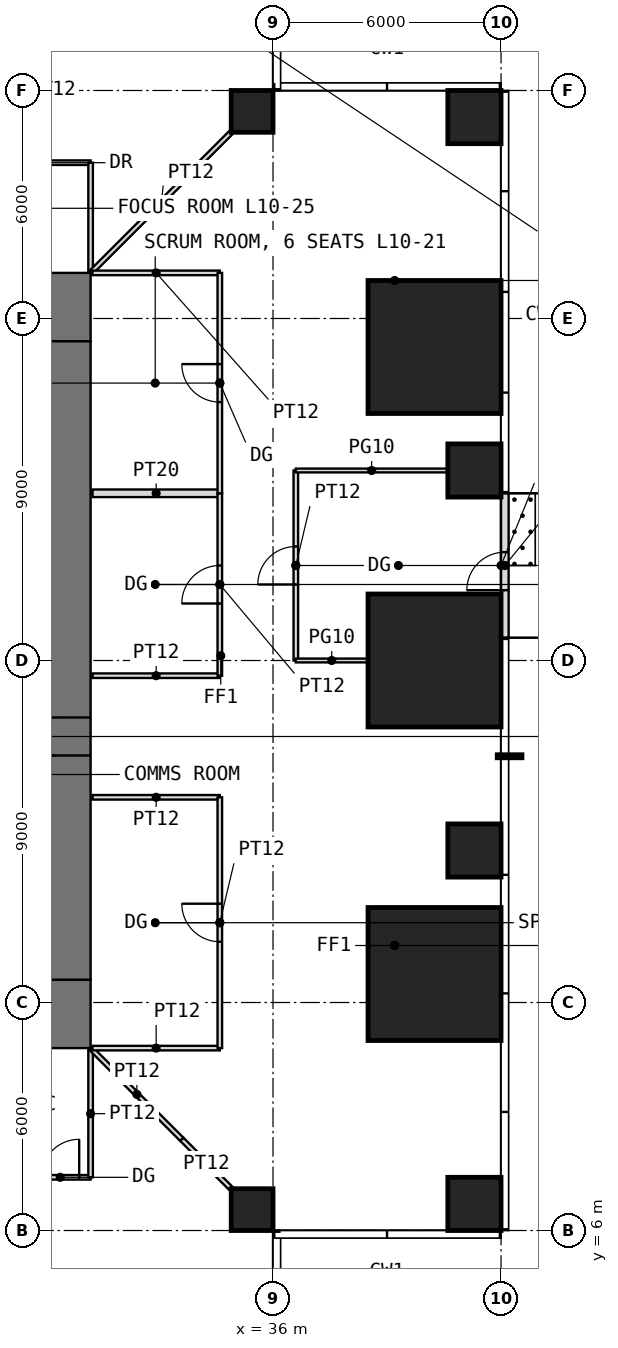
"""IFC4 building model, lengths in metres.
Left out: names, types, materials, properties, quantities, classifications, styles, units other than length and angle.
Written with IfcOpenShell. Run it as: python <this file> out.ifc"""

import sys

from ifc_helpers import new_model, si_unit, direction, frame, frame_2d, origin, origin_2d, place, context, subcontext, project, spatial, rectangle, extrude, element, fill, save


model = new_model("IFC4")
c1 = context("Model", 3, precision=1e-05, world=origin(), true_north=direction((0.0, 1.0)))
c2 = subcontext(c1, "Body", "Model", "MODEL_VIEW")
j1 = project(units=[si_unit("LENGTHUNIT", "METRE"), si_unit("PLANEANGLEUNIT", "RADIAN")], contexts=[c1])
p1 = place(None, origin())
s1 = spatial("IfcSite", under=j1, at=p1, CompositionType="ELEMENT")
p2 = place(p1, origin())
s2 = spatial("IfcBuilding", under=s1, at=p2, CompositionType="ELEMENT")
p3 = place(p2, frame((0.0, 0.0, 46.5)))
s3 = spatial("IfcBuildingStorey", under=s2, at=p3, CompositionType="ELEMENT", Elevation=46.5)
p4 = place(p3, frame((35.45, 6.55, 0.0), z_axis=(0.0, 0.0, 1.0), x_axis=(1.0, 0.0, 0.0)))
e1 = element("IfcColumn", 1, at=p4, inside=s3, PredefinedType="COLUMN", context=c2, shape_type="SweptSolid", body=[
    extrude(rectangle(XDim=1.1, YDim=1.1, at=origin_2d()), origin(), (0.0, 0.0, 1.0), 4.0),
])
p5 = place(p3, frame((41.3, 6.7, 0.0), z_axis=(0.0, 0.0, 1.0), x_axis=(1.0, 0.0, 0.0)))
e2 = element("IfcColumn", 2, at=p5, inside=s3, PredefinedType="COLUMN", context=c2, shape_type="SweptSolid", body=[
    extrude(rectangle(XDim=1.4, YDim=1.4, at=origin_2d()), origin(), (0.0, 0.0, 1.0), 4.0),
])
p6 = place(p3, frame((40.25, 12.75, 0.0), z_axis=(0.0, 0.0, 1.0), x_axis=(1.0, 0.0, 0.0)))
e3 = element("IfcColumn", 3, at=p6, inside=s3, PredefinedType="COLUMN", context=c2, shape_type="SweptSolid", body=[
    extrude(rectangle(XDim=3.5, YDim=3.5, at=origin_2d()), origin(), (0.0, 0.0, 1.0), 4.0),
])
p7 = place(p3, frame((41.3, 16.0, 0.0), z_axis=(0.0, 0.0, 1.0), x_axis=(1.0, 0.0, 0.0)))
e4 = element("IfcColumn", 4, at=p7, inside=s3, PredefinedType="COLUMN", context=c2, shape_type="SweptSolid", body=[
    extrude(rectangle(XDim=1.4, YDim=1.4, at=origin_2d()), origin(), (0.0, 0.0, 1.0), 4.0),
])
p8 = place(p3, frame((40.25, 21.0, 0.0), z_axis=(0.0, 0.0, 1.0), x_axis=(1.0, 0.0, 0.0)))
e5 = element("IfcColumn", 5, at=p8, inside=s3, PredefinedType="COLUMN", context=c2, shape_type="SweptSolid", body=[
    extrude(rectangle(XDim=3.5, YDim=3.5, at=origin_2d()), origin(), (0.0, 0.0, 1.0), 4.0),
])
p9 = place(p3, frame((41.3, 26.0, 0.0), z_axis=(0.0, 0.0, 1.0), x_axis=(1.0, 0.0, 0.0)))
e6 = element("IfcColumn", 6, at=p9, inside=s3, PredefinedType="COLUMN", context=c2, shape_type="SweptSolid", body=[
    extrude(rectangle(XDim=1.4, YDim=1.4, at=origin_2d()), origin(), (0.0, 0.0, 1.0), 4.0),
])
p10 = place(p3, frame((40.25, 29.25, 0.0), z_axis=(0.0, 0.0, 1.0), x_axis=(1.0, 0.0, 0.0)))
e7 = element("IfcColumn", 7, at=p10, inside=s3, PredefinedType="COLUMN", context=c2, shape_type="SweptSolid", body=[
    extrude(rectangle(XDim=3.5, YDim=3.5, at=origin_2d()), origin(), (0.0, 0.0, 1.0), 4.0),
])
p11 = place(p3, frame((35.45, 35.45, 0.0), z_axis=(0.0, 0.0, 1.0), x_axis=(1.0, 0.0, 0.0)))
e8 = element("IfcColumn", 8, at=p11, inside=s3, PredefinedType="COLUMN", context=c2, shape_type="SweptSolid", body=[
    extrude(rectangle(XDim=1.1, YDim=1.1, at=origin_2d()), origin(), (0.0, 0.0, 1.0), 4.0),
])
p12 = place(p3, frame((41.3, 35.3, 0.0), z_axis=(0.0, 0.0, 1.0), x_axis=(1.0, 0.0, 0.0)))
e9 = element("IfcColumn", 9, at=p12, inside=s3, PredefinedType="COLUMN", context=c2, shape_type="SweptSolid", body=[
    extrude(rectangle(XDim=1.4, YDim=1.4, at=origin_2d()), origin(), (0.0, 0.0, 1.0), 4.0),
])
p13 = place(p3, frame((42.1, 21.6, 0.0), z_axis=(0.0, 0.0, 1.0), x_axis=(0.0, 1.0, 0.0)))
e10 = element("IfcWall", 10, at=p13, inside=s3, PredefinedType="USERDEFINED", context=c2, shape_type="SweptSolid", body=[
    extrude(rectangle(XDim=3.8, YDim=0.2, at=frame_2d((1.9, 0.0))), origin(), (0.0, 0.0, 1.0), 3.75),
])
p14 = place(p13, frame((1.25, 0.0, 0.0)))
e11 = element("IfcOpeningElement", 11, at=p14, cuts=e10, PredefinedType="OPENING", context=c2, shape_type="SweptSolid", body=[
    extrude(rectangle(XDim=1.0, YDim=2.4, at=frame_2d((0.5, 1.2))), frame((0.0, 0.11, 0.0), z_axis=(0.0, -1.0, 0.0), x_axis=(1.0, 0.0, 0.0)), (0.0, 0.0, 1.0), 0.22),
])
p15 = place(p3, frame((10.8, 11.7, -0.05), z_axis=(0.0, 0.0, 1.0), x_axis=(1.0, 0.0, 0.0)))
e12 = element("IfcWall", 12, at=p15, inside=s3, PredefinedType="SHEAR", context=c2, shape_type="SweptSolid", body=[
    extrude(rectangle(XDim=20.4, YDim=1.8, at=frame_2d((10.2, 0.0))), origin(), (0.0, 0.0, 1.0), 4.0),
])
p16 = place(p15, frame((9.2, 0.0, 0.05)))
e13 = element("IfcOpeningElement", 13, at=p16, cuts=e12, PredefinedType="OPENING", context=c2, shape_type="SweptSolid", body=[
    extrude(rectangle(XDim=2.0, YDim=2.2, at=frame_2d((1.0, 1.1))), frame((0.0, 0.91, 0.0), z_axis=(0.0, -1.0, 0.0), x_axis=(1.0, 0.0, 0.0)), (0.0, 0.0, 1.0), 1.82),
])
p17 = place(p3, frame((10.8, 30.3, -0.05), z_axis=(0.0, 0.0, 1.0), x_axis=(1.0, 0.0, 0.0)))
e14 = element("IfcWall", 14, at=p17, inside=s3, PredefinedType="SHEAR", context=c2, shape_type="SweptSolid", body=[
    extrude(rectangle(XDim=20.4, YDim=1.8, at=frame_2d((10.2, 0.0))), origin(), (0.0, 0.0, 1.0), 4.0),
])
p18 = place(p17, frame((9.2, 0.0, 0.05)))
e15 = element("IfcOpeningElement", 15, at=p18, cuts=e14, PredefinedType="OPENING", context=c2, shape_type="SweptSolid", body=[
    extrude(rectangle(XDim=2.0, YDim=2.2, at=frame_2d((1.0, 1.1))), frame((0.0, 0.91, 0.0), z_axis=(0.0, -1.0, 0.0), x_axis=(1.0, 0.0, 0.0)), (0.0, 0.0, 1.0), 1.82),
])
p19 = place(p3, frame((30.3, 12.6, -0.05), z_axis=(0.0, 0.0, 1.0), x_axis=(0.0, 1.0, 0.0)))
e16 = element("IfcWall", 16, at=p19, inside=s3, PredefinedType="SHEAR", context=c2, shape_type="SweptSolid", body=[
    extrude(rectangle(XDim=16.8, YDim=1.8, at=frame_2d((8.4, 0.0))), origin(), (0.0, 0.0, 1.0), 4.0),
])
p20 = place(p19, frame((5.9, 0.0, 0.05)))
e17 = element("IfcOpeningElement", 17, at=p20, cuts=e16, PredefinedType="OPENING", context=c2, shape_type="SweptSolid", body=[
    extrude(rectangle(XDim=1.0, YDim=2.2, at=frame_2d((0.5, 1.1))), frame((0.0, 0.91, 0.0), z_axis=(0.0, -1.0, 0.0), x_axis=(1.0, 0.0, 0.0)), (0.0, 0.0, 1.0), 1.82),
])
p21 = place(p3, frame((27.0, 34.1, 0.0), z_axis=(0.0, 0.0, 1.0), x_axis=(1.0, 0.0, 0.0)))
e18 = element("IfcWall", 18, at=p21, inside=s3, PredefinedType="PARTITIONING", context=c2, shape_type="SweptSolid", body=[
    extrude(rectangle(XDim=4.2, YDim=0.12, at=frame_2d((2.1, 0.0))), origin(), (0.0, 0.0, 1.0), 3.75),
])
p22 = place(p21, frame((1.6, 0.0, 0.0)))
e19 = element("IfcOpeningElement", 19, at=p22, cuts=e18, PredefinedType="OPENING", context=c2, shape_type="SweptSolid", body=[
    extrude(rectangle(XDim=1.0, YDim=2.2, at=frame_2d((0.5, 1.1))), frame((0.0, 0.07, 0.0), z_axis=(0.0, -1.0, 0.0), x_axis=(1.0, 0.0, 0.0)), (0.0, 0.0, 1.0), 0.14),
])
p23 = place(p3, frame((27.4, 7.4, 0.0), z_axis=(0.0, 0.0, 1.0), x_axis=(1.0, 0.0, 0.0)))
e20 = element("IfcWall", 20, at=p23, inside=s3, PredefinedType="PARTITIONING", context=c2, shape_type="SweptSolid", body=[
    extrude(rectangle(XDim=3.8, YDim=0.12, at=frame_2d((1.9, 0.0))), origin(), (0.0, 0.0, 1.0), 3.75),
])
p24 = place(p23, frame((2.5, 0.0, 0.0)))
e21 = element("IfcOpeningElement", 21, at=p24, cuts=e20, PredefinedType="OPENING", context=c2, shape_type="SweptSolid", body=[
    extrude(rectangle(XDim=1.0, YDim=2.4, at=frame_2d((0.5, 1.2))), frame((0.0, 0.07, 0.0), z_axis=(0.0, -1.0, 0.0), x_axis=(1.0, 0.0, 0.0)), (0.0, 0.0, 1.0), 0.14),
])
p25 = place(p3, frame((31.2, 7.4, 0.0), z_axis=(0.0, 0.0, 1.0), x_axis=(0.0, 1.0, 0.0)))
e22 = element("IfcWall", 22, at=p25, inside=s3, PredefinedType="PARTITIONING", context=c2, shape_type="SweptSolid", body=[
    extrude(rectangle(XDim=3.35, YDim=0.12, at=frame_2d((1.675, 0.0))), origin(), (0.0, 0.0, 1.0), 3.75),
])
p26 = place(p3, frame((31.2, 31.25, 0.0), z_axis=(0.0, 0.0, 1.0), x_axis=(0.0, 1.0, 0.0)))
e23 = element("IfcWall", 23, at=p26, inside=s3, PredefinedType="PARTITIONING", context=c2, shape_type="SweptSolid", body=[
    extrude(rectangle(XDim=2.85, YDim=0.12, at=frame_2d((1.425, 0.0))), origin(), (0.0, 0.0, 1.0), 3.75),
])
p27 = place(p3, frame((31.235, 10.765, 0.0), z_axis=(0.0, 0.0, 1.0), x_axis=(0.707106781187, -0.707106781187, 0.0)))
e24 = element("IfcWall", 24, at=p27, inside=s3, PredefinedType="PARTITIONING", context=c2, shape_type="SweptSolid", body=[
    extrude(rectangle(XDim=3.346, YDim=0.12, at=frame_2d((1.673, 0.0))), origin(), (0.0, 0.0, 1.0), 3.75),
])
p28 = place(p3, frame((31.235, 31.235, 0.0), z_axis=(0.0, 0.0, 1.0), x_axis=(0.707106781187, 0.707106781187, 0.0)))
e25 = element("IfcWall", 25, at=p28, inside=s3, PredefinedType="PARTITIONING", context=c2, shape_type="SweptSolid", body=[
    extrude(rectangle(XDim=5.168, YDim=0.12, at=frame_2d((2.584, 0.0))), origin(), (0.0, 0.0, 1.0), 3.75),
])
for number, where, z_axis, x_axis in (
    (26, (31.25, 10.8, 0.0), (0.0, 0.0, 1.0), (1.0, 0.0, 0.0)),
    (27, (31.25, 17.4, 0.0), (0.0, 0.0, 1.0), (1.0, 0.0, 0.0)),
    (28, (31.25, 20.6, 0.0), (0.0, 0.0, 1.0), (1.0, 0.0, 0.0)),
):
    element("IfcWall", number, at=place(p3, frame(where, z_axis=z_axis, x_axis=x_axis)), inside=s3, PredefinedType="PARTITIONING", context=c2, shape_type="SweptSolid", body=[
        extrude(rectangle(XDim=3.35, YDim=0.12, at=frame_2d((1.675, 0.0))), origin(), (0.0, 0.0, 1.0), 3.75),
    ])
p29 = place(p3, frame((31.25, 25.4, 0.0), z_axis=(0.0, 0.0, 1.0), x_axis=(1.0, 0.0, 0.0)))
e29 = element("IfcWall", 29, at=p29, inside=s3, PredefinedType="PARTITIONING", context=c2, shape_type="SweptSolid", body=[
    extrude(rectangle(XDim=3.35, YDim=0.2, at=frame_2d((1.675, 0.0))), origin(), (0.0, 0.0, 1.0), 3.75),
])
p30 = place(p3, frame((31.25, 31.2, 0.0), z_axis=(0.0, 0.0, 1.0), x_axis=(1.0, 0.0, 0.0)))
e30 = element("IfcWall", 30, at=p30, inside=s3, PredefinedType="PARTITIONING", context=c2, shape_type="SweptSolid", body=[
    extrude(rectangle(XDim=3.35, YDim=0.12, at=frame_2d((1.675, 0.0))), origin(), (0.0, 0.0, 1.0), 3.75),
])
p31 = place(p3, frame((33.602, 8.398, 0.0), z_axis=(0.0, 0.0, 1.0), x_axis=(0.707106781187, -0.707106781187, 0.0)))
e31 = element("IfcWall", 31, at=p31, inside=s3, PredefinedType="PARTITIONING", context=c2, shape_type="SweptSolid", body=[
    extrude(rectangle(XDim=1.822, YDim=0.12, at=frame_2d((0.911, 0.0))), origin(), (0.0, 0.0, 1.0), 3.75),
])
p32 = place(p3, frame((34.6, 10.8, 0.0), z_axis=(0.0, 0.0, 1.0), x_axis=(0.0, 1.0, 0.0)))
e32 = element("IfcWall", 32, at=p32, inside=s3, PredefinedType="PARTITIONING", context=c2, shape_type="SweptSolid", body=[
    extrude(rectangle(XDim=6.6, YDim=0.12, at=frame_2d((3.3, 0.0))), origin(), (0.0, 0.0, 1.0), 3.75),
])
p33 = place(p32, frame((2.8, 0.0, 0.0)))
e33 = element("IfcOpeningElement", 33, at=p33, cuts=e32, PredefinedType="OPENING", context=c2, shape_type="SweptSolid", body=[
    extrude(rectangle(XDim=1.0, YDim=2.4, at=frame_2d((0.5, 1.2))), frame((0.0, 0.07, 0.0), z_axis=(0.0, -1.0, 0.0), x_axis=(1.0, 0.0, 0.0)), (0.0, 0.0, 1.0), 0.14),
])
p34 = place(p3, frame((34.6, 20.6, 0.0), z_axis=(0.0, 0.0, 1.0), x_axis=(0.0, 1.0, 0.0)))
e34 = element("IfcWall", 34, at=p34, inside=s3, PredefinedType="PARTITIONING", context=c2, shape_type="SweptSolid", body=[
    extrude(rectangle(XDim=4.8, YDim=0.12, at=frame_2d((2.4, 0.0))), origin(), (0.0, 0.0, 1.0), 3.75),
])
p35 = place(p34, frame((1.9, 0.0, 0.0)))
e35 = element("IfcOpeningElement", 35, at=p35, cuts=e34, PredefinedType="OPENING", context=c2, shape_type="SweptSolid", body=[
    extrude(rectangle(XDim=1.0, YDim=2.4, at=frame_2d((0.5, 1.2))), frame((0.0, 0.07, 0.0), z_axis=(0.0, -1.0, 0.0), x_axis=(1.0, 0.0, 0.0)), (0.0, 0.0, 1.0), 0.14),
])
p36 = place(p3, frame((34.6, 25.4, 0.0), z_axis=(0.0, 0.0, 1.0), x_axis=(0.0, 1.0, 0.0)))
e36 = element("IfcWall", 36, at=p36, inside=s3, PredefinedType="PARTITIONING", context=c2, shape_type="SweptSolid", body=[
    extrude(rectangle(XDim=5.8, YDim=0.12, at=frame_2d((2.9, 0.0))), origin(), (0.0, 0.0, 1.0), 3.75),
])
p37 = place(p36, frame((2.4, 0.0, 0.0)))
e37 = element("IfcOpeningElement", 37, at=p37, cuts=e36, PredefinedType="OPENING", context=c2, shape_type="SweptSolid", body=[
    extrude(rectangle(XDim=1.0, YDim=2.4, at=frame_2d((0.5, 1.2))), frame((0.0, 0.07, 0.0), z_axis=(0.0, -1.0, 0.0), x_axis=(1.0, 0.0, 0.0)), (0.0, 0.0, 1.0), 0.14),
])
p38 = place(p3, frame((36.6, 21.0, 0.0), z_axis=(0.0, 0.0, 1.0), x_axis=(0.0, 1.0, 0.0)))
e38 = element("IfcWall", 38, at=p38, inside=s3, PredefinedType="PARTITIONING", context=c2, shape_type="SweptSolid", body=[
    extrude(rectangle(XDim=5.0, YDim=0.12, at=frame_2d((2.5, 0.0))), origin(), (0.0, 0.0, 1.0), 3.75),
])
p39 = place(p38, frame((2.0, 0.0, 0.0)))
e39 = element("IfcOpeningElement", 39, at=p39, cuts=e38, PredefinedType="OPENING", context=c2, shape_type="SweptSolid", body=[
    extrude(rectangle(XDim=1.0, YDim=2.4, at=frame_2d((0.5, 1.2))), frame((0.0, 0.07, 0.0), z_axis=(0.0, -1.0, 0.0), x_axis=(1.0, 0.0, 0.0)), (0.0, 0.0, 1.0), 0.14),
])
p40 = place(p3, frame((36.6, 21.0, 0.0), z_axis=(0.0, 0.0, 1.0), x_axis=(1.0, 0.0, 0.0)))
e40 = element("IfcWall", 40, at=p40, inside=s3, PredefinedType="PARTITIONING", context=c2, shape_type="SweptSolid", body=[
    extrude(rectangle(XDim=1.89, YDim=0.1, at=frame_2d((0.945, 0.0))), origin(), (0.0, 0.0, 1.0), 3.75),
])
p41 = place(p3, frame((36.6, 26.0, 0.0), z_axis=(0.0, 0.0, 1.0), x_axis=(1.0, 0.0, 0.0)))
e41 = element("IfcWall", 41, at=p41, inside=s3, PredefinedType="PARTITIONING", context=c2, shape_type="SweptSolid", body=[
    extrude(rectangle(XDim=3.99, YDim=0.1, at=frame_2d((1.995, 0.0))), origin(), (0.0, 0.0, 1.0), 3.75),
])
p42 = place(p14, origin())
e42 = element("IfcDoor", 42, at=p42, inside=s3, OperationType="SINGLE_SWING_LEFT", PredefinedType="DOOR", context=c2, shape_type="SweptSolid", body=[
    extrude(rectangle(XDim=1.0, YDim=2.4, at=frame_2d((0.5, 1.2))), frame((0.0, 0.025, 0.0), z_axis=(0.0, -1.0, 0.0), x_axis=(1.0, 0.0, 0.0)), (0.0, 0.0, 1.0), 0.05),
])
fill(e11, e42)
p43 = place(p20, origin())
e43 = element("IfcDoor", 43, at=p43, inside=s3, OperationType="SINGLE_SWING_LEFT", PredefinedType="DOOR", context=c2, shape_type="SweptSolid", body=[
    extrude(rectangle(XDim=1.0, YDim=2.2, at=frame_2d((0.5, 1.1))), frame((0.0, 0.025, 0.0), z_axis=(0.0, -1.0, 0.0), x_axis=(1.0, 0.0, 0.0)), (0.0, 0.0, 1.0), 0.05),
])
fill(e17, e43)
p44 = place(p33, origin())
e44 = element("IfcDoor", 44, at=p44, inside=s3, OperationType="SINGLE_SWING_RIGHT", PredefinedType="DOOR", context=c2, shape_type="SweptSolid", body=[
    extrude(rectangle(XDim=1.0, YDim=2.4, at=frame_2d((0.5, 1.2))), frame((0.0, 0.025, 0.0), z_axis=(0.0, -1.0, 0.0), x_axis=(1.0, 0.0, 0.0)), (0.0, 0.0, 1.0), 0.05),
])
fill(e33, e44)
p45 = place(p35, origin())
e45 = element("IfcDoor", 45, at=p45, inside=s3, OperationType="SINGLE_SWING_LEFT", PredefinedType="DOOR", context=c2, shape_type="SweptSolid", body=[
    extrude(rectangle(XDim=1.0, YDim=2.4, at=frame_2d((0.5, 1.2))), frame((0.0, 0.025, 0.0), z_axis=(0.0, -1.0, 0.0), x_axis=(1.0, 0.0, 0.0)), (0.0, 0.0, 1.0), 0.05),
])
fill(e35, e45)
p46 = place(p37, origin())
e46 = element("IfcDoor", 46, at=p46, inside=s3, OperationType="SINGLE_SWING_RIGHT", PredefinedType="DOOR", context=c2, shape_type="SweptSolid", body=[
    extrude(rectangle(XDim=1.0, YDim=2.4, at=frame_2d((0.5, 1.2))), frame((0.0, 0.025, 0.0), z_axis=(0.0, -1.0, 0.0), x_axis=(1.0, 0.0, 0.0)), (0.0, 0.0, 1.0), 0.05),
])
fill(e37, e46)
p47 = place(p39, origin())
e47 = element("IfcDoor", 47, at=p47, inside=s3, OperationType="SINGLE_SWING_LEFT", PredefinedType="DOOR", context=c2, shape_type="SweptSolid", body=[
    extrude(rectangle(XDim=1.0, YDim=2.4, at=frame_2d((0.5, 1.2))), frame((0.0, 0.025, 0.0), z_axis=(0.0, -1.0, 0.0), x_axis=(1.0, 0.0, 0.0)), (0.0, 0.0, 1.0), 0.05),
])
fill(e39, e47)
p48 = place(p24, origin())
e48 = element("IfcDoor", 48, at=p48, inside=s3, OperationType="SINGLE_SWING_RIGHT", PredefinedType="DOOR", context=c2, shape_type="SweptSolid", body=[
    extrude(rectangle(XDim=1.0, YDim=2.4, at=frame_2d((0.5, 1.2))), frame((0.0, 0.025, 0.0), z_axis=(0.0, -1.0, 0.0), x_axis=(1.0, 0.0, 0.0)), (0.0, 0.0, 1.0), 0.05),
])
fill(e21, e48)
save(model, sys.argv[1])
